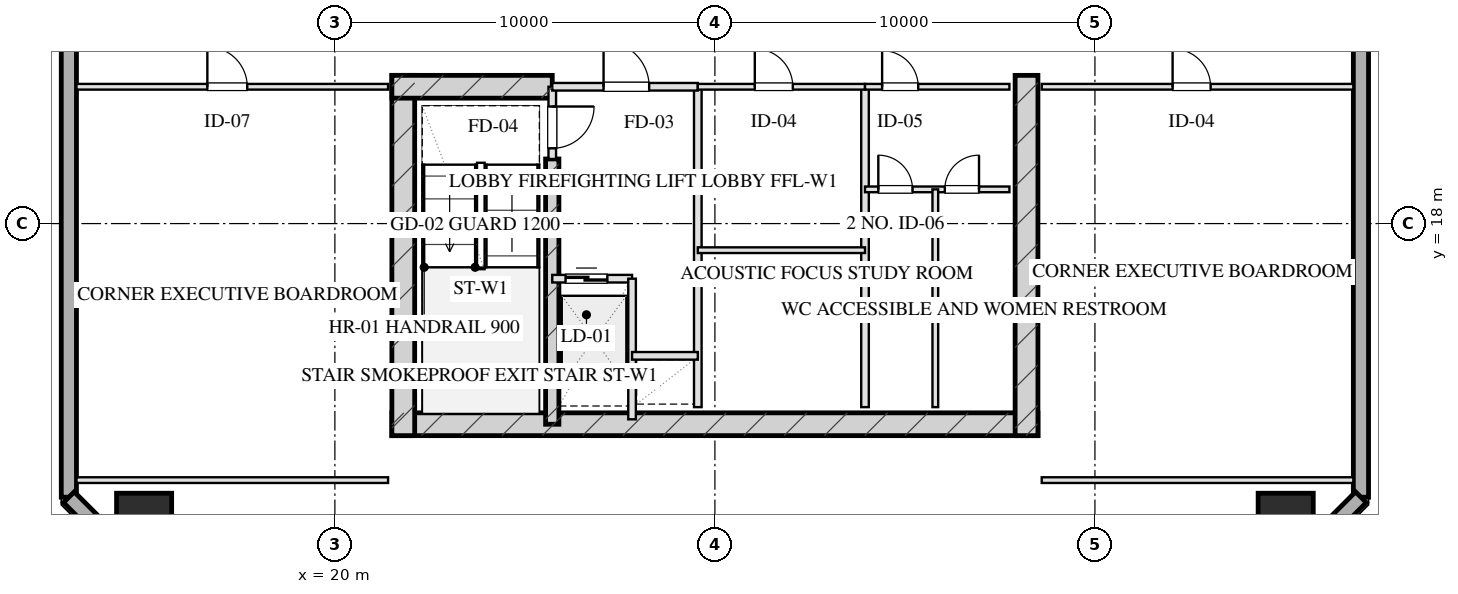
"""IFC4 building model, lengths in metres.
Left out: names, types, materials, properties, quantities, classifications, styles, units other than length and angle.
Written with IfcOpenShell. Run it as: python <this file> out.ifc"""

import sys

from ifc_helpers import new_model, si_unit, direction, frame, frame_2d, origin, origin_2d, place, context, subcontext, project, spatial, rectangle, hollow_rectangle, extrude, element, fill, save


model = new_model("IFC4")
c1 = context("Model", 3, precision=1e-05, world=origin(), true_north=direction((0.0, 1.0)))
c2 = subcontext(c1, "Body", "Model", "MODEL_VIEW")
j1 = project(units=[si_unit("LENGTHUNIT", "METRE"), si_unit("PLANEANGLEUNIT", "RADIAN")], contexts=[c1])
p1 = place(None, origin())
s1 = spatial("IfcSite", under=j1, at=p1, CompositionType="ELEMENT")
p2 = place(p1, origin())
s2 = spatial("IfcBuilding", under=s1, at=p2, CompositionType="ELEMENT")
p3 = place(p2, frame((0.0, 0.0, 166.75)))
s3 = spatial("IfcBuildingStorey", under=s2, at=p3, CompositionType="ELEMENT", Elevation=166.75)
p4 = place(p3, frame((21.5, 12.72, 0.0), z_axis=(0.0, 0.0, 1.0), x_axis=(1.0, 0.0, 0.0)))
e1 = element("IfcWall", 1, at=p4, inside=s3, PredefinedType="SHEAR", context=c2, shape_type="SweptSolid", body=[
    extrude(rectangle(XDim=17.0, YDim=0.6, at=frame_2d((8.5, 0.0))), origin(), (0.0, 0.0, 1.0), 3.45),
])
for number, where, z_axis, x_axis in (
    (2, (21.8, 21.9, 0.0), (0.0, 0.0, 1.0), (0.0, -1.0, 0.0)),
    (3, (38.2, 21.9, 0.0), (0.0, 0.0, 1.0), (0.0, -1.0, 0.0)),
):
    element("IfcWall", number, at=place(p3, frame(where, z_axis=z_axis, x_axis=x_axis)), inside=s3, PredefinedType="SHEAR", context=c2, shape_type="SweptSolid", body=[
        extrude(rectangle(XDim=9.48, YDim=0.6, at=frame_2d((4.74, 0.0))), origin(), (0.0, 0.0, 1.0), 3.45),
    ])
p5 = place(p3, frame((25.72, 19.7, 0.0), z_axis=(0.0, 0.0, 1.0), x_axis=(0.0, -1.0, 0.0)))
e4 = element("IfcWall", 4, at=p5, inside=s3, PredefinedType="SHEAR", context=c2, shape_type="SweptSolid", body=[
    extrude(rectangle(XDim=6.98, YDim=0.35, at=frame_2d((3.49, 0.0))), origin(), (0.0, 0.0, 1.0), 3.45),
])
p6 = place(p3, frame((21.5, 21.6, 0.0), z_axis=(0.0, 0.0, 1.0), x_axis=(1.0, 0.0, 0.0)))
e5 = element("IfcWall", 5, at=p6, inside=s3, PredefinedType="SHEAR", context=c2, shape_type="SweptSolid", body=[
    extrude(rectangle(XDim=4.22, YDim=0.6, at=frame_2d((2.11, 0.0))), origin(), (0.0, 0.0, 1.0), 3.45),
])
for number, where, z_axis, x_axis in (
    (6, (14.98, 10.18, 0.0), (0.0, 0.0, 1.0), (1.0, 0.0, 0.0)),
    (7, (45.02, 10.18, 0.0), (0.0, 0.0, 1.0), (1.0, 0.0, 0.0)),
):
    element("IfcColumn", number, at=place(p3, frame(where, z_axis=z_axis, x_axis=x_axis)), inside=s3, PredefinedType="COLUMN", context=c2, shape_type="SweptSolid", body=[
        extrude(hollow_rectangle(XDim=1.45, YDim=1.45, WallThickness=0.05, at=origin_2d()), origin(), (0.0, 0.0, 1.0), 3.451),
    ])
p7 = place(p3, frame((13.0, 10.8, 0.0), z_axis=(0.0, 0.0, 1.0), x_axis=(0.0, 1.0, 0.0)))
e8 = element("IfcWall", 8, at=p7, inside=s3, PredefinedType="SOLIDWALL", context=c2, shape_type="SweptSolid", body=[
    extrude(rectangle(XDim=46.4, YDim=0.4, at=frame_2d((23.2, 0.0))), origin(), (0.0, 0.0, 1.0), 2.61),
])
p8 = place(p7, frame((16.85, 0.0, 0.0)))
e9 = element("IfcOpeningElement", 9, at=p8, cuts=e8, PredefinedType="OPENING", context=c2, shape_type="SweptSolid", body=[
    extrude(rectangle(XDim=1.1, YDim=2.15, at=frame_2d((0.55, 1.075))), frame((0.0, 0.21, 0.0), z_axis=(0.0, -1.0, 0.0), x_axis=(1.0, 0.0, 0.0)), (0.0, 0.0, 1.0), 0.42),
])
p9 = place(p3, frame((47.0, 57.2, 0.0), z_axis=(0.0, 0.0, 1.0), x_axis=(0.0, -1.0, 0.0)))
e10 = element("IfcWall", 10, at=p9, inside=s3, PredefinedType="SOLIDWALL", context=c2, shape_type="SweptSolid", body=[
    extrude(rectangle(XDim=46.4, YDim=0.4, at=frame_2d((23.2, 0.0))), origin(), (0.0, 0.0, 1.0), 2.61),
])
p10 = place(p9, frame((25.596, 0.0, 0.0)))
e11 = element("IfcOpeningElement", 11, at=p10, cuts=e10, PredefinedType="OPENING", context=c2, shape_type="SweptSolid", body=[
    extrude(rectangle(XDim=1.1, YDim=2.15, at=frame_2d((0.55, 1.075))), frame((0.0, 0.21, 0.0), z_axis=(0.0, -1.0, 0.0), x_axis=(1.0, 0.0, 0.0)), (0.0, 0.0, 1.0), 0.42),
])
for number, where, z_axis, x_axis in (
    (12, (47.0, 10.8, 0.0), (0.0, 0.0, 1.0), (-0.707, -0.707, 0.0)),
    (13, (15.6, 8.2, 0.0), (0.0, 0.0, 1.0), (-0.707, 0.707, 0.0)),
):
    element("IfcWall", number, at=place(p3, frame(where, z_axis=z_axis, x_axis=x_axis)), inside=s3, PredefinedType="SOLIDWALL", context=c2, shape_type="SweptSolid", body=[
        extrude(rectangle(XDim=3.677, YDim=0.4, at=frame_2d((1.838, 0.0))), origin(), (0.0, 0.0, 1.0), 2.61),
    ])
p11 = place(p3, frame((25.72, 21.6, 0.0), z_axis=(0.0, 0.0, 1.0), x_axis=(0.0, -1.0, 0.0)))
e14 = element("IfcWall", 14, at=p11, inside=s3, PredefinedType="PARTITIONING", context=c2, shape_type="SweptSolid", body=[
    extrude(rectangle(XDim=1.9, YDim=0.2, at=frame_2d((0.95, 0.0))), origin(), (0.0, 0.0, 1.0), 3.175),
])
p12 = place(p11, frame((0.52, 0.0, 0.0)))
e15 = element("IfcOpeningElement", 15, at=p12, cuts=e14, PredefinedType="OPENING", context=c2, shape_type="SweptSolid", body=[
    extrude(rectangle(XDim=1.1, YDim=2.05, at=frame_2d((0.55, 1.025))), frame((0.0, 0.11, 0.0), z_axis=(0.0, -1.0, 0.0), x_axis=(1.0, 0.0, 0.0)), (0.0, 0.0, 1.0), 0.22),
])
p13 = place(p3, frame((29.55, 21.6, 0.0), z_axis=(0.0, 0.0, 1.0), x_axis=(0.0, -1.0, 0.0)))
e16 = element("IfcWall", 16, at=p13, inside=s3, PredefinedType="PARTITIONING", context=c2, shape_type="SweptSolid", body=[
    extrude(rectangle(XDim=8.43, YDim=0.2, at=frame_2d((4.215, 0.0))), origin(), (0.0, 0.0, 1.0), 3.175),
])
p14 = place(p3, frame((25.72, 21.6, 0.0), z_axis=(0.0, 0.0, 1.0), x_axis=(1.0, 0.0, 0.0)))
e17 = element("IfcWall", 17, at=p14, inside=s3, PredefinedType="PARTITIONING", context=c2, shape_type="SweptSolid", body=[
    extrude(rectangle(XDim=3.83, YDim=0.2, at=frame_2d((1.915, 0.0))), origin(), (0.0, 0.0, 1.0), 3.175),
])
p15 = place(p14, frame((1.35, 0.0, 0.0)))
e18 = element("IfcOpeningElement", 18, at=p15, cuts=e17, PredefinedType="OPENING", context=c2, shape_type="SweptSolid", body=[
    extrude(rectangle(XDim=1.2, YDim=2.05, at=frame_2d((0.6, 1.025))), frame((0.0, 0.11, 0.0), z_axis=(0.0, -1.0, 0.0), x_axis=(1.0, 0.0, 0.0)), (0.0, 0.0, 1.0), 0.22),
])
p16 = place(p3, frame((25.72, 16.55, 0.0), z_axis=(0.0, 0.0, 1.0), x_axis=(1.0, 0.0, 0.0)))
e19 = element("IfcWall", 19, at=p16, inside=s3, PredefinedType="PARTITIONING", context=c2, shape_type="SweptSolid", body=[
    extrude(rectangle(XDim=2.1, YDim=0.2, at=frame_2d((1.05, 0.0))), origin(), (0.0, 0.0, 1.0), 3.175),
])
p17 = place(p16, frame((0.35, 0.0, 0.0)))
e20 = element("IfcOpeningElement", 20, at=p17, cuts=e19, PredefinedType="OPENING", context=c2, shape_type="SweptSolid", body=[
    extrude(rectangle(XDim=1.1, YDim=2.05, at=frame_2d((0.55, 1.025))), frame((0.0, 0.11, 0.0), z_axis=(0.0, -1.0, 0.0), x_axis=(1.0, 0.0, 0.0)), (0.0, 0.0, 1.0), 0.22),
])
p18 = place(p3, frame((27.82, 16.55, 0.0), z_axis=(0.0, 0.0, 1.0), x_axis=(0.0, -1.0, 0.0)))
e21 = element("IfcWall", 21, at=p18, inside=s3, PredefinedType="PARTITIONING", context=c2, shape_type="SweptSolid", body=[
    extrude(rectangle(XDim=3.7, YDim=0.2, at=frame_2d((1.85, 0.0))), origin(), (0.0, 0.0, 1.0), 3.175),
])
p19 = place(p3, frame((27.82, 14.52, 0.0), z_axis=(0.0, 0.0, 1.0), x_axis=(1.0, 0.0, 0.0)))
e22 = element("IfcWall", 22, at=p19, inside=s3, PredefinedType="PARTITIONING", context=c2, shape_type="SweptSolid", body=[
    extrude(rectangle(XDim=1.73, YDim=0.2, at=frame_2d((0.865, 0.0))), origin(), (0.0, 0.0, 1.0), 3.175),
])
p20 = place(p3, frame((33.95, 21.6, 0.0), z_axis=(0.0, 0.0, 1.0), x_axis=(0.0, -1.0, 0.0)))
e23 = element("IfcWall", 23, at=p20, inside=s3, PredefinedType="PARTITIONING", context=c2, shape_type="SweptSolid", body=[
    extrude(rectangle(XDim=8.43, YDim=0.2, at=frame_2d((4.215, 0.0))), origin(), (0.0, 0.0, 1.0), 3.175),
])
p21 = place(p3, frame((29.55, 21.6, 0.0), z_axis=(0.0, 0.0, 1.0), x_axis=(1.0, 0.0, 0.0)))
e24 = element("IfcWall", 24, at=p21, inside=s3, PredefinedType="PARTITIONING", context=c2, shape_type="SweptSolid", body=[
    extrude(rectangle(XDim=4.4, YDim=0.15, at=frame_2d((2.2, 0.0))), origin(), (0.0, 0.0, 1.0), 3.175),
])
p22 = place(p21, frame((1.5, 0.0, 0.0)))
e25 = element("IfcOpeningElement", 25, at=p22, cuts=e24, PredefinedType="OPENING", context=c2, shape_type="SweptSolid", body=[
    extrude(rectangle(XDim=1.0, YDim=2.05, at=frame_2d((0.5, 1.025))), frame((0.0, 0.085, 0.0), z_axis=(0.0, -1.0, 0.0), x_axis=(1.0, 0.0, 0.0)), (0.0, 0.0, 1.0), 0.17),
])
p23 = place(p3, frame((29.55, 17.3, 0.0), z_axis=(0.0, 0.0, 1.0), x_axis=(1.0, 0.0, 0.0)))
e26 = element("IfcWall", 26, at=p23, inside=s3, PredefinedType="PARTITIONING", context=c2, shape_type="SweptSolid", body=[
    extrude(rectangle(XDim=4.4, YDim=0.15, at=frame_2d((2.2, 0.0))), origin(), (0.0, 0.0, 1.0), 3.175),
])
p24 = place(p3, frame((33.95, 21.6, 0.0), z_axis=(0.0, 0.0, 1.0), x_axis=(1.0, 0.0, 0.0)))
e27 = element("IfcWall", 27, at=p24, inside=s3, PredefinedType="PARTITIONING", context=c2, shape_type="SweptSolid", body=[
    extrude(rectangle(XDim=3.8, YDim=0.15, at=frame_2d((1.9, 0.0))), origin(), (0.0, 0.0, 1.0), 3.175),
])
p25 = place(p24, frame((0.45, 0.0, 0.0)))
e28 = element("IfcOpeningElement", 28, at=p25, cuts=e27, PredefinedType="OPENING", context=c2, shape_type="SweptSolid", body=[
    extrude(rectangle(XDim=0.95, YDim=2.05, at=frame_2d((0.475, 1.025))), frame((0.0, 0.085, 0.0), z_axis=(0.0, -1.0, 0.0), x_axis=(1.0, 0.0, 0.0)), (0.0, 0.0, 1.0), 0.17),
])
p26 = place(p3, frame((33.95, 18.9, 0.0), z_axis=(0.0, 0.0, 1.0), x_axis=(1.0, 0.0, 0.0)))
e29 = element("IfcWall", 29, at=p26, inside=s3, PredefinedType="PARTITIONING", context=c2, shape_type="SweptSolid", body=[
    extrude(rectangle(XDim=3.8, YDim=0.15, at=frame_2d((1.9, 0.0))), origin(), (0.0, 0.0, 1.0), 3.175),
])
p27 = place(p26, frame((0.35, 0.0, 0.0)))
e30 = element("IfcOpeningElement", 30, at=p27, cuts=e29, PredefinedType="OPENING", context=c2, shape_type="SweptSolid", body=[
    extrude(rectangle(XDim=0.9, YDim=2.05, at=frame_2d((0.45, 1.025))), frame((0.0, 0.085, 0.0), z_axis=(0.0, -1.0, 0.0), x_axis=(1.0, 0.0, 0.0)), (0.0, 0.0, 1.0), 0.17),
])
p28 = place(p26, frame((2.1, 0.0, 0.0)))
e31 = element("IfcOpeningElement", 31, at=p28, cuts=e29, PredefinedType="OPENING", context=c2, shape_type="SweptSolid", body=[
    extrude(rectangle(XDim=0.9, YDim=2.05, at=frame_2d((0.45, 1.025))), frame((0.0, 0.085, 0.0), z_axis=(0.0, -1.0, 0.0), x_axis=(1.0, 0.0, 0.0)), (0.0, 0.0, 1.0), 0.17),
])
p29 = place(p3, frame((35.8, 18.9, 0.0), z_axis=(0.0, 0.0, 1.0), x_axis=(0.0, -1.0, 0.0)))
e32 = element("IfcWall", 32, at=p29, inside=s3, PredefinedType="PARTITIONING", context=c2, shape_type="SweptSolid", body=[
    extrude(rectangle(XDim=5.73, YDim=0.15, at=frame_2d((2.865, 0.0))), origin(), (0.0, 0.0, 1.0), 3.175),
])
p30 = place(p3, frame((13.2, 11.25, 0.0), z_axis=(0.0, 0.0, 1.0), x_axis=(1.0, 0.0, 0.0)))
e33 = element("IfcWall", 33, at=p30, inside=s3, PredefinedType="PARTITIONING", context=c2, shape_type="SweptSolid", body=[
    extrude(rectangle(XDim=8.2, YDim=0.15, at=frame_2d((4.1, 0.0))), origin(), (0.0, 0.0, 1.0), 3.175),
])
p31 = place(p3, frame((13.2, 21.6, 0.0), z_axis=(0.0, 0.0, 1.0), x_axis=(1.0, 0.0, 0.0)))
e34 = element("IfcWall", 34, at=p31, inside=s3, PredefinedType="PARTITIONING", context=c2, shape_type="SweptSolid", body=[
    extrude(rectangle(XDim=8.2, YDim=0.15, at=frame_2d((4.1, 0.0))), origin(), (0.0, 0.0, 1.0), 3.175),
])
p32 = place(p31, frame((3.444, 0.0, 0.0)))
e35 = element("IfcOpeningElement", 35, at=p32, cuts=e34, PredefinedType="OPENING", context=c2, shape_type="SweptSolid", body=[
    extrude(rectangle(XDim=1.05, YDim=2.05, at=frame_2d((0.525, 1.025))), frame((0.0, 0.085, 0.0), z_axis=(0.0, -1.0, 0.0), x_axis=(1.0, 0.0, 0.0)), (0.0, 0.0, 1.0), 0.17),
])
p33 = place(p3, frame((38.6, 11.25, 0.0), z_axis=(0.0, 0.0, 1.0), x_axis=(1.0, 0.0, 0.0)))
e36 = element("IfcWall", 36, at=p33, inside=s3, PredefinedType="PARTITIONING", context=c2, shape_type="SweptSolid", body=[
    extrude(rectangle(XDim=8.2, YDim=0.15, at=frame_2d((4.1, 0.0))), origin(), (0.0, 0.0, 1.0), 3.175),
])
p34 = place(p3, frame((38.6, 21.6, 0.0), z_axis=(0.0, 0.0, 1.0), x_axis=(1.0, 0.0, 0.0)))
e37 = element("IfcWall", 37, at=p34, inside=s3, PredefinedType="PARTITIONING", context=c2, shape_type="SweptSolid", body=[
    extrude(rectangle(XDim=8.2, YDim=0.15, at=frame_2d((4.1, 0.0))), origin(), (0.0, 0.0, 1.0), 3.175),
])
p35 = place(p34, frame((3.444, 0.0, 0.0)))
e38 = element("IfcOpeningElement", 38, at=p35, cuts=e37, PredefinedType="OPENING", context=c2, shape_type="SweptSolid", body=[
    extrude(rectangle(XDim=1.0, YDim=2.05, at=frame_2d((0.5, 1.025))), frame((0.0, 0.085, 0.0), z_axis=(0.0, -1.0, 0.0), x_axis=(1.0, 0.0, 0.0)), (0.0, 0.0, 1.0), 0.17),
])
p36 = place(p12, origin())
e39 = element("IfcDoor", 39, at=p36, inside=s3, OperationType="SINGLE_SWING_LEFT", PredefinedType="DOOR", context=c2, shape_type="SweptSolid", body=[
    extrude(rectangle(XDim=1.1, YDim=2.05, at=frame_2d((0.55, 1.025))), frame((0.0, 0.025, 0.0), z_axis=(0.0, -1.0, 0.0), x_axis=(1.0, 0.0, 0.0)), (0.0, 0.0, 1.0), 0.05),
])
fill(e15, e39)
p37 = place(p15, origin())
e40 = element("IfcDoor", 40, at=p37, inside=s3, OperationType="SINGLE_SWING_LEFT", PredefinedType="DOOR", context=c2, shape_type="SweptSolid", body=[
    extrude(rectangle(XDim=1.2, YDim=2.05, at=frame_2d((0.6, 1.025))), frame((0.0, 0.025, 0.0), z_axis=(0.0, -1.0, 0.0), x_axis=(1.0, 0.0, 0.0)), (0.0, 0.0, 1.0), 0.05),
])
fill(e18, e40)
p38 = place(p17, origin())
e41 = element("IfcDoor", 41, at=p38, inside=s3, OperationType="DOUBLE_DOOR_SLIDING", PredefinedType="DOOR", context=c2, shape_type="SweptSolid", body=[
    extrude(rectangle(XDim=1.1, YDim=2.05, at=frame_2d((0.55, 1.025))), frame((0.0, 0.025, 0.0), z_axis=(0.0, -1.0, 0.0), x_axis=(1.0, 0.0, 0.0)), (0.0, 0.0, 1.0), 0.05),
])
fill(e20, e41)
p39 = place(p22, origin())
e42 = element("IfcDoor", 42, at=p39, inside=s3, OperationType="SINGLE_SWING_LEFT", PredefinedType="DOOR", context=c2, shape_type="SweptSolid", body=[
    extrude(rectangle(XDim=1.0, YDim=2.05, at=frame_2d((0.5, 1.025))), frame((0.0, 0.025, 0.0), z_axis=(0.0, -1.0, 0.0), x_axis=(1.0, 0.0, 0.0)), (0.0, 0.0, 1.0), 0.05),
])
fill(e25, e42)
p40 = place(p25, origin())
e43 = element("IfcDoor", 43, at=p40, inside=s3, OperationType="SINGLE_SWING_LEFT", PredefinedType="DOOR", context=c2, shape_type="SweptSolid", body=[
    extrude(rectangle(XDim=0.95, YDim=2.05, at=frame_2d((0.475, 1.025))), frame((0.0, 0.025, 0.0), z_axis=(0.0, -1.0, 0.0), x_axis=(1.0, 0.0, 0.0)), (0.0, 0.0, 1.0), 0.05),
])
fill(e28, e43)
p41 = place(p27, origin())
e44 = element("IfcDoor", 44, at=p41, inside=s3, OperationType="SINGLE_SWING_LEFT", PredefinedType="DOOR", context=c2, shape_type="SweptSolid", body=[
    extrude(rectangle(XDim=0.9, YDim=2.05, at=frame_2d((0.45, 1.025))), frame((0.0, 0.025, 0.0), z_axis=(0.0, -1.0, 0.0), x_axis=(1.0, 0.0, 0.0)), (0.0, 0.0, 1.0), 0.05),
])
fill(e30, e44)
p42 = place(p28, origin())
e45 = element("IfcDoor", 45, at=p42, inside=s3, OperationType="SINGLE_SWING_RIGHT", PredefinedType="DOOR", context=c2, shape_type="SweptSolid", body=[
    extrude(rectangle(XDim=0.9, YDim=2.05, at=frame_2d((0.45, 1.025))), frame((0.0, 0.025, 0.0), z_axis=(0.0, -1.0, 0.0), x_axis=(1.0, 0.0, 0.0)), (0.0, 0.0, 1.0), 0.05),
])
fill(e31, e45)
p43 = place(p32, origin())
e46 = element("IfcDoor", 46, at=p43, inside=s3, OperationType="SINGLE_SWING_LEFT", PredefinedType="DOOR", context=c2, shape_type="SweptSolid", body=[
    extrude(rectangle(XDim=1.05, YDim=2.05, at=frame_2d((0.525, 1.025))), frame((0.0, 0.025, 0.0), z_axis=(0.0, -1.0, 0.0), x_axis=(1.0, 0.0, 0.0)), (0.0, 0.0, 1.0), 0.05),
])
fill(e35, e46)
p44 = place(p35, origin())
e47 = element("IfcDoor", 47, at=p44, inside=s3, OperationType="SINGLE_SWING_LEFT", PredefinedType="DOOR", context=c2, shape_type="SweptSolid", body=[
    extrude(rectangle(XDim=1.0, YDim=2.05, at=frame_2d((0.5, 1.025))), frame((0.0, 0.025, 0.0), z_axis=(0.0, -1.0, 0.0), x_axis=(1.0, 0.0, 0.0)), (0.0, 0.0, 1.0), 0.05),
])
fill(e38, e47)
save(model, sys.argv[1])
